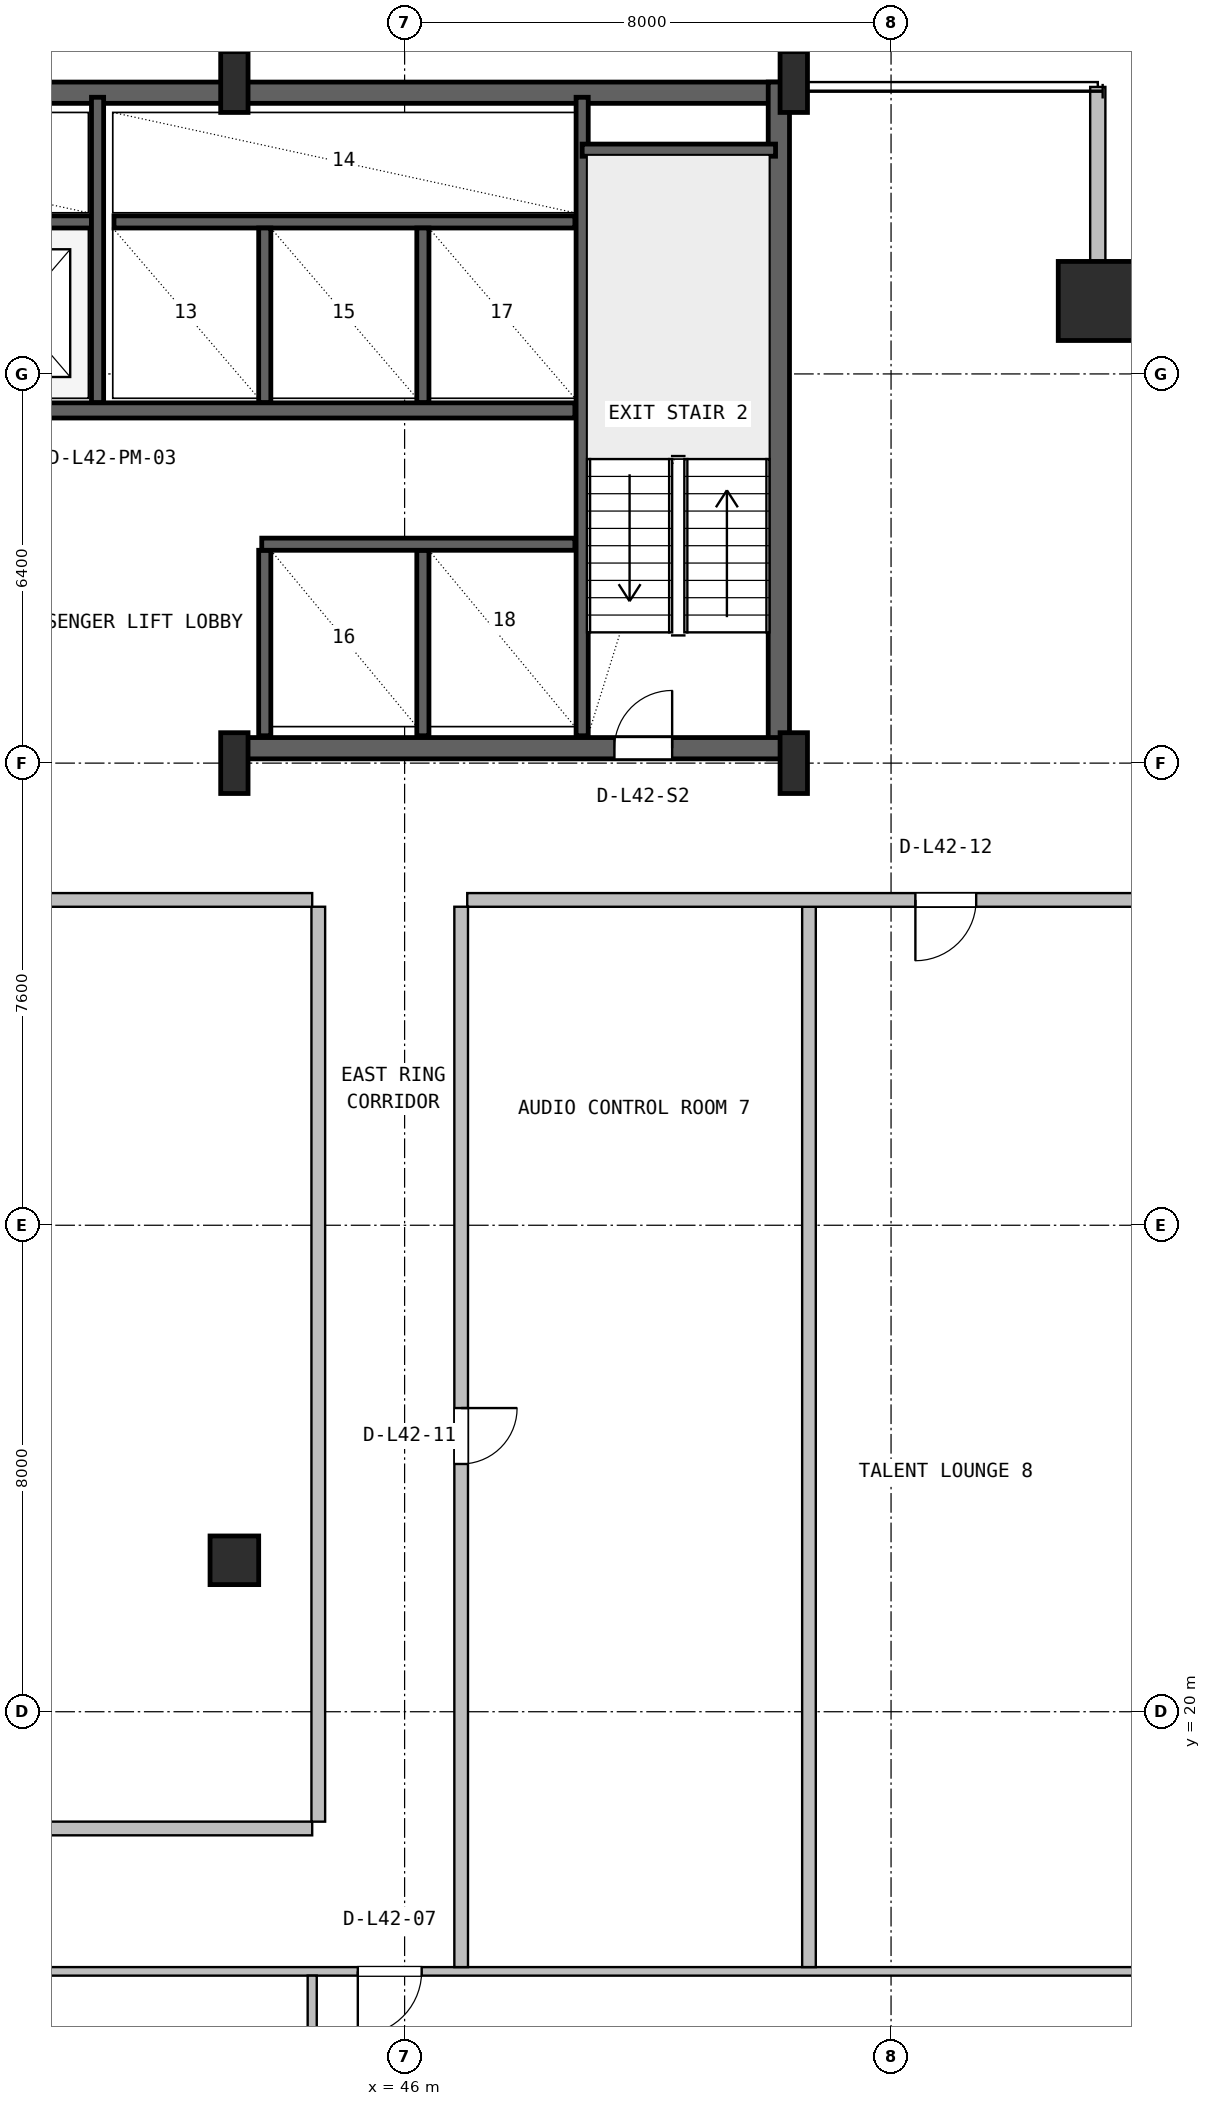
"""IFC4 building model, lengths in metres.
Left out: names, types, materials, properties, quantities, classifications, styles, units other than length and angle.
Written with IfcOpenShell. Run it as: python <this file> out.ifc"""

import sys

from ifc_helpers import new_model, si_unit, direction, frame, frame_2d, origin, origin_2d, place, context, subcontext, project, spatial, rectangle, hollow_rectangle, i_section, extrude, source, transform, mapped, element, fill, save


model = new_model("IFC4")
c1 = context("Model", 3, precision=1e-05, world=origin(), true_north=direction((0.0, 1.0)))
c2 = subcontext(c1, "Body", "Model", "MODEL_VIEW")
j1 = project(units=[si_unit("LENGTHUNIT", "METRE"), si_unit("PLANEANGLEUNIT", "RADIAN")], contexts=[c1])
p1 = place(None, origin())
s1 = spatial("IfcSite", under=j1, at=p1, CompositionType="ELEMENT")
p2 = place(p1, origin())
s2 = spatial("IfcBuilding", under=s1, at=p2, CompositionType="ELEMENT")
p3 = place(p2, frame((0.0, 0.0, 172.4)))
s3 = spatial("IfcBuildingStorey", under=s2, at=p3, CompositionType="ELEMENT", Elevation=172.4)
p4 = place(p3, frame((15.6, 46.625, 0.0), z_axis=(0.0, 0.0, 1.0), x_axis=(1.0, 0.0, 0.0)))
e1 = element("IfcWall", 1, at=p4, inside=s3, PredefinedType="SHEAR", context=c2, shape_type="SweptSolid", body=[
    extrude(rectangle(XDim=36.8, YDim=0.35, at=frame_2d((18.4, 0.0))), origin(), (0.0, 0.0, 1.0), 3.55),
])
p5 = place(p3, frame((52.155, 35.67, 0.0), z_axis=(0.0, 0.0, 1.0), x_axis=(0.0, 1.0, 0.0)))
e2 = element("IfcWall", 2, at=p5, inside=s3, PredefinedType="SHEAR", context=c2, shape_type="SweptSolid", body=[
    extrude(rectangle(XDim=11.13, YDim=0.35, at=frame_2d((5.565, 0.0))), origin(), (0.0, 0.0, 1.0), 3.55),
])
p6 = place(p3, frame((43.2, 35.845, 0.0), z_axis=(0.0, 0.0, 1.0), x_axis=(1.0, 0.0, 0.0)))
e3 = element("IfcWall", 3, at=p6, inside=s3, PredefinedType="SHEAR", context=c2, shape_type="SweptSolid", body=[
    extrude(rectangle(XDim=9.13, YDim=0.35, at=frame_2d((4.565, 0.0))), origin(), (0.0, 0.0, 1.0), 3.55),
])
p7 = place(p6, frame((6.25, 0.0, 0.0)))
e4 = element("IfcOpeningElement", 4, at=p7, cuts=e3, PredefinedType="OPENING", context=c2, shape_type="SweptSolid", body=[
    extrude(rectangle(XDim=0.95, YDim=2.1, at=frame_2d((0.475, 1.05))), frame((0.0, 0.185, 0.0), z_axis=(0.0, -1.0, 0.0), x_axis=(1.0, 0.0, 0.0)), (0.0, 0.0, 1.0), 0.37),
])
m1 = source(origin(), c2, "Body", "SweptSolid", [
    extrude(i_section(OverallWidth=0.45, OverallDepth=1.0, WebThickness=0.016, FlangeThickness=0.03, FilletRadius=0.016, at=origin_2d()), origin(), (0.0, 0.0, 1.0), 3.8),
])
for number, where, z_axis, x_axis in (
    (5, (43.2, 35.6, 0.0), (0.0, 0.0, 1.0), (1.0, 0.0, 0.0)),
    (6, (43.2, 46.8, 0.0), (0.0, 0.0, 1.0), (1.0, 0.0, 0.0)),
    (7, (52.4, 35.6, 0.0), (0.0, 0.0, 1.0), (1.0, 0.0, 0.0)),
    (8, (52.4, 46.8, 0.0), (0.0, 0.0, 1.0), (1.0, 0.0, 0.0)),
):
    element("IfcColumn", number, at=place(p3, frame(where, z_axis=z_axis, x_axis=x_axis)), inside=s3, PredefinedType="COLUMN", context=c2, shape_type="MappedRepresentation", body=[
        mapped(m1, transform((0.0, 0.0, 0.0), x_axis=(1.0, 0.0, 0.0), y_axis=(0.0, 1.0, 0.0), z_axis=(0.0, 0.0, 1.0), scale=1.0)),
    ])
m2 = source(origin(), c2, "Body", "SweptSolid", [
    extrude(hollow_rectangle(XDim=1.3, YDim=1.3, WallThickness=0.05, at=origin_2d()), origin(), (0.0, 0.0, 1.0), 3.8),
])
p8 = place(p3, frame((57.4, 43.2, 0.0), z_axis=(0.0, 0.0, 1.0), x_axis=(1.0, 0.0, 0.0)))
e9 = element("IfcColumn", 9, at=p8, inside=s3, PredefinedType="COLUMN", context=c2, shape_type="MappedRepresentation", body=[
    mapped(m2, transform((0.0, 0.0, 0.0), x_axis=(1.0, 0.0, 0.0), y_axis=(0.0, 1.0, 0.0), z_axis=(0.0, 0.0, 1.0), scale=1.0)),
])
m3 = source(origin(), c2, "Body", "SweptSolid", [
    extrude(rectangle(XDim=0.8, YDim=0.8, at=origin_2d()), origin(), (0.0, 0.0, 1.0), 3.8),
])
p9 = place(p3, frame((43.2, 22.49, 0.0), z_axis=(0.0, 0.0, 1.0), x_axis=(1.0, 0.0, 0.0)))
e10 = element("IfcColumn", 10, at=p9, inside=s3, PredefinedType="COLUMN", context=c2, shape_type="MappedRepresentation", body=[
    mapped(m3, transform((0.0, 0.0, 0.0), x_axis=(1.0, 0.0, 0.0), y_axis=(0.0, 1.0, 0.0), z_axis=(0.0, 0.0, 1.0), scale=1.0)),
])
p10 = place(p3, frame((57.53, 43.2, 0.0), z_axis=(0.0, 0.0, 1.0), x_axis=(1.0, 0.0, 0.0)))
e11 = element("IfcWall", 11, at=p10, inside=s3, PredefinedType="SOLIDWALL", context=c2, shape_type="SweptSolid", body=[
    extrude(rectangle(XDim=3.39, YDim=0.25, at=frame_2d((1.695, 0.0))), origin(), (0.0, 0.0, 1.0), 3.53),
])
p11 = place(p3, frame((57.4, 43.12, 0.0), z_axis=(0.0, 0.0, 1.0), x_axis=(0.0, 1.0, 0.0)))
e12 = element("IfcWall", 12, at=p11, inside=s3, PredefinedType="SOLIDWALL", context=c2, shape_type="SweptSolid", body=[
    extrude(rectangle(XDim=3.6, YDim=0.25, at=frame_2d((1.8, 0.0))), origin(), (0.0, 0.0, 1.0), 3.108),
])
p12 = place(p3, frame((48.92, 36.05, 0.0), z_axis=(0.0, 0.0, 1.0), x_axis=(0.0, 1.0, 0.0)))
e13 = element("IfcWall", 13, at=p12, inside=s3, PredefinedType="SHEAR", context=c2, shape_type="SweptSolid", body=[
    extrude(rectangle(XDim=10.5, YDim=0.2, at=frame_2d((5.25, 0.0))), origin(), (0.0, 0.0, 1.0), 3.55),
])
p13 = place(p3, frame((48.92, 45.68, 0.0), z_axis=(0.0, 0.0, 1.0), x_axis=(1.0, 0.0, 0.0)))
e14 = element("IfcWall", 14, at=p13, inside=s3, PredefinedType="SHEAR", context=c2, shape_type="SweptSolid", body=[
    extrude(rectangle(XDim=3.18, YDim=0.2, at=frame_2d((1.59, 0.0))), origin(), (0.0, 0.0, 1.0), 3.55),
])
p14 = place(p3, frame((24.98, 41.4, 0.0), z_axis=(0.0, 0.0, 1.0), x_axis=(1.0, 0.0, 0.0)))
e15 = element("IfcWall", 15, at=p14, inside=s3, PredefinedType="SHEAR", context=c2, shape_type="SweptSolid", body=[
    extrude(rectangle(XDim=23.82, YDim=0.25, at=frame_2d((11.91, 0.0))), origin(), (0.0, 0.0, 1.0), 3.55),
])
p15 = place(p14, frame((8.87, 0.0, 0.0)))
e16 = element("IfcOpeningElement", 16, at=p15, cuts=e15, PredefinedType="OPENING", context=c2, shape_type="SweptSolid", body=[
    extrude(rectangle(XDim=1.1, YDim=2.18, at=frame_2d((0.55, 1.09))), frame((0.0, 0.135, 0.0), z_axis=(0.0, -1.0, 0.0), x_axis=(1.0, 0.0, 0.0)), (0.0, 0.0, 1.0), 0.27),
])
p16 = place(p14, frame((11.47, 0.0, 0.0)))
e17 = element("IfcOpeningElement", 17, at=p16, cuts=e15, PredefinedType="OPENING", context=c2, shape_type="SweptSolid", body=[
    extrude(rectangle(XDim=1.1, YDim=2.18, at=frame_2d((0.55, 1.09))), frame((0.0, 0.135, 0.0), z_axis=(0.0, -1.0, 0.0), x_axis=(1.0, 0.0, 0.0)), (0.0, 0.0, 1.0), 0.27),
])
p17 = place(p14, frame((14.07, 0.0, 0.0)))
e18 = element("IfcOpeningElement", 18, at=p17, cuts=e15, PredefinedType="OPENING", context=c2, shape_type="SweptSolid", body=[
    extrude(rectangle(XDim=1.1, YDim=2.18, at=frame_2d((0.55, 1.09))), frame((0.0, 0.135, 0.0), z_axis=(0.0, -1.0, 0.0), x_axis=(1.0, 0.0, 0.0)), (0.0, 0.0, 1.0), 0.27),
])
p18 = place(p14, frame((1.81, 0.0, 0.0)))
e19 = element("IfcOpeningElement", 19, at=p18, cuts=e15, PredefinedType="OPENING", context=c2, shape_type="SweptSolid", body=[
    extrude(rectangle(XDim=0.92, YDim=2.08, at=frame_2d((0.46, 1.04))), frame((0.0, 0.135, 0.0), z_axis=(0.0, -1.0, 0.0), x_axis=(1.0, 0.0, 0.0)), (0.0, 0.0, 1.0), 0.27),
])
p19 = place(p14, frame((5.71, 0.0, 0.0)))
e20 = element("IfcOpeningElement", 20, at=p19, cuts=e15, PredefinedType="OPENING", context=c2, shape_type="SweptSolid", body=[
    extrude(rectangle(XDim=0.92, YDim=2.08, at=frame_2d((0.46, 1.04))), frame((0.0, 0.135, 0.0), z_axis=(0.0, -1.0, 0.0), x_axis=(1.0, 0.0, 0.0)), (0.0, 0.0, 1.0), 0.27),
])
p20 = place(p3, frame((33.22, 44.5, 0.0), z_axis=(0.0, 0.0, 1.0), x_axis=(1.0, 0.0, 0.0)))
e21 = element("IfcWall", 21, at=p20, inside=s3, PredefinedType="SHEAR", context=c2, shape_type="SweptSolid", body=[
    extrude(rectangle(XDim=7.63, YDim=0.2, at=frame_2d((3.815, 0.0))), origin(), (0.0, 0.0, 1.0), 3.55),
])
p21 = place(p3, frame((40.95, 41.53, 0.0), z_axis=(0.0, 0.0, 1.0), x_axis=(0.0, 1.0, 0.0)))
e22 = element("IfcWall", 22, at=p21, inside=s3, PredefinedType="SHEAR", context=c2, shape_type="SweptSolid", body=[
    extrude(rectangle(XDim=5.02, YDim=0.2, at=frame_2d((2.51, 0.0))), origin(), (0.0, 0.0, 1.0), 3.55),
])
p22 = place(p3, frame((41.22, 44.5, 0.0), z_axis=(0.0, 0.0, 1.0), x_axis=(1.0, 0.0, 0.0)))
e23 = element("IfcWall", 23, at=p22, inside=s3, PredefinedType="SHEAR", context=c2, shape_type="SweptSolid", body=[
    extrude(rectangle(XDim=7.58, YDim=0.2, at=frame_2d((3.79, 0.0))), origin(), (0.0, 0.0, 1.0), 3.55),
])
for number, where, z_axis, x_axis in (
    (24, (43.7, 41.53, 0.0), (0.0, 0.0, 1.0), (0.0, 1.0, 0.0)),
    (25, (46.3, 41.53, 0.0), (0.0, 0.0, 1.0), (0.0, 1.0, 0.0)),
):
    element("IfcWall", number, at=place(p3, frame(where, z_axis=z_axis, x_axis=x_axis)), inside=s3, PredefinedType="SHEAR", context=c2, shape_type="SweptSolid", body=[
        extrude(rectangle(XDim=2.87, YDim=0.2, at=frame_2d((1.435, 0.0))), origin(), (0.0, 0.0, 1.0), 3.55),
    ])
for number, where, z_axis, x_axis in (
    (26, (43.7, 36.05, 0.0), (0.0, 0.0, 1.0), (0.0, 1.0, 0.0)),
    (27, (46.3, 36.05, 0.0), (0.0, 0.0, 1.0), (0.0, 1.0, 0.0)),
):
    element("IfcWall", number, at=place(p3, frame(where, z_axis=z_axis, x_axis=x_axis)), inside=s3, PredefinedType="SHEAR", context=c2, shape_type="SweptSolid", body=[
        extrude(rectangle(XDim=3.05, YDim=0.2, at=frame_2d((1.525, 0.0))), origin(), (0.0, 0.0, 1.0), 3.55),
    ])
p23 = place(p3, frame((43.65, 39.2, 0.0), z_axis=(0.0, 0.0, 1.0), x_axis=(1.0, 0.0, 0.0)))
e28 = element("IfcWall", 28, at=p23, inside=s3, PredefinedType="SHEAR", context=c2, shape_type="SweptSolid", body=[
    extrude(rectangle(XDim=5.15, YDim=0.2, at=frame_2d((2.575, 0.0))), origin(), (0.0, 0.0, 1.0), 3.55),
])
p24 = place(p3, frame((7.18, 15.73, 0.0), z_axis=(0.0, 0.0, 1.0), x_axis=(1.0, 0.0, 0.0)))
e29 = element("IfcWall", 29, at=p24, inside=s3, PredefinedType="PARTITIONING", context=c2, shape_type="SweptSolid", body=[
    extrude(rectangle(XDim=53.64, YDim=0.14, at=frame_2d((26.82, 0.0))), origin(), (0.0, 0.0, 1.0), 2.909),
])
p25 = place(p24, frame((14.035, 0.0, 0.0)))
e30 = element("IfcOpeningElement", 30, at=p25, cuts=e29, PredefinedType="OPENING", context=c2, shape_type="SweptSolid", body=[
    extrude(rectangle(XDim=1.0, YDim=2.1, at=frame_2d((0.5, 1.05))), frame((0.0, 0.08, 0.0), z_axis=(0.0, -1.0, 0.0), x_axis=(1.0, 0.0, 0.0)), (0.0, 0.0, 1.0), 0.16),
])
p26 = place(p24, frame((26.115, 0.0, 0.0)))
e31 = element("IfcOpeningElement", 31, at=p26, cuts=e29, PredefinedType="OPENING", context=c2, shape_type="SweptSolid", body=[
    extrude(rectangle(XDim=0.88, YDim=2.06, at=frame_2d((0.44, 1.03))), frame((0.0, 0.08, 0.0), z_axis=(0.0, -1.0, 0.0), x_axis=(1.0, 0.0, 0.0)), (0.0, 0.0, 1.0), 0.16),
])
p27 = place(p24, frame((38.05, 0.0, 0.0)))
e32 = element("IfcOpeningElement", 32, at=p27, cuts=e29, PredefinedType="OPENING", context=c2, shape_type="SweptSolid", body=[
    extrude(rectangle(XDim=1.05, YDim=2.1, at=frame_2d((0.525, 1.05))), frame((0.0, 0.08, 0.0), z_axis=(0.0, -1.0, 0.0), x_axis=(1.0, 0.0, 0.0)), (0.0, 0.0, 1.0), 0.16),
])
p28 = place(p3, frame((44.48, 7.38, 0.0), z_axis=(0.0, 0.0, 1.0), x_axis=(0.0, 1.0, 0.0)))
e33 = element("IfcWall", 33, at=p28, inside=s3, PredefinedType="PARTITIONING", context=c2, shape_type="SweptSolid", body=[
    extrude(rectangle(XDim=8.28, YDim=0.15, at=frame_2d((4.14, 0.0))), origin(), (0.0, 0.0, 1.0), 3.108),
])
p29 = place(p3, frame((22.99, 18.08, 0.0), z_axis=(0.0, 0.0, 1.0), x_axis=(1.0, 0.0, 0.0)))
e34 = element("IfcWall", 34, at=p29, inside=s3, PredefinedType="PARTITIONING", context=c2, shape_type="SweptSolid", body=[
    extrude(rectangle(XDim=21.49, YDim=0.225, at=frame_2d((10.745, 0.0))), origin(), (0.0, 0.0, 1.0), 2.909),
])
p30 = place(p29, frame((10.045, 0.0, 0.0)))
e35 = element("IfcOpeningElement", 35, at=p30, cuts=e34, PredefinedType="OPENING", context=c2, shape_type="SweptSolid", body=[
    extrude(rectangle(XDim=1.4, YDim=2.12, at=frame_2d((0.7, 1.06))), frame((0.0, 0.123, 0.0), z_axis=(0.0, -1.0, 0.0), x_axis=(1.0, 0.0, 0.0)), (0.0, 0.0, 1.0), 0.245),
])
p31 = place(p3, frame((44.58, 18.192, 0.0), z_axis=(0.0, 0.0, 1.0), x_axis=(0.0, 1.0, 0.0)))
e36 = element("IfcWall", 36, at=p31, inside=s3, PredefinedType="PARTITIONING", context=c2, shape_type="SweptSolid", body=[
    extrude(rectangle(XDim=15.046, YDim=0.225, at=frame_2d((7.523, 0.0))), origin(), (0.0, 0.0, 1.0), 3.222),
])
p32 = place(p3, frame((22.99, 33.35, 0.0), z_axis=(0.0, 0.0, 1.0), x_axis=(1.0, 0.0, 0.0)))
e37 = element("IfcWall", 37, at=p32, inside=s3, PredefinedType="PARTITIONING", context=c2, shape_type="SweptSolid", body=[
    extrude(rectangle(XDim=21.49, YDim=0.225, at=frame_2d((10.745, 0.0))), origin(), (0.0, 0.0, 1.0), 2.909),
])
p33 = place(p3, frame((52.65, 15.8, 0.0), z_axis=(0.0, 0.0, 1.0), x_axis=(0.0, 1.0, 0.0)))
e38 = element("IfcWall", 38, at=p33, inside=s3, PredefinedType="PARTITIONING", context=c2, shape_type="SweptSolid", body=[
    extrude(rectangle(XDim=17.438, YDim=0.225, at=frame_2d((8.719, 0.0))), origin(), (0.0, 0.0, 1.0), 3.222),
])
p34 = place(p3, frame((47.03, 33.35, 0.0), z_axis=(0.0, 0.0, 1.0), x_axis=(1.0, 0.0, 0.0)))
e39 = element("IfcWall", 39, at=p34, inside=s3, PredefinedType="PARTITIONING", context=c2, shape_type="SweptSolid", body=[
    extrude(rectangle(XDim=13.79, YDim=0.225, at=frame_2d((6.895, 0.0))), origin(), (0.0, 0.0, 1.0), 3.108),
])
p35 = place(p34, frame((7.37, 0.0, 0.0)))
e40 = element("IfcOpeningElement", 40, at=p35, cuts=e39, PredefinedType="OPENING", context=c2, shape_type="SweptSolid", body=[
    extrude(rectangle(XDim=1.0, YDim=2.1, at=frame_2d((0.5, 1.05))), frame((0.0, 0.123, 0.0), z_axis=(0.0, -1.0, 0.0), x_axis=(1.0, 0.0, 0.0)), (0.0, 0.0, 1.0), 0.245),
])
p36 = place(p3, frame((46.93, 15.8, 0.0), z_axis=(0.0, 0.0, 1.0), x_axis=(0.0, 1.0, 0.0)))
e41 = element("IfcWall", 41, at=p36, inside=s3, PredefinedType="PARTITIONING", context=c2, shape_type="SweptSolid", body=[
    extrude(rectangle(XDim=17.438, YDim=0.225, at=frame_2d((8.719, 0.0))), origin(), (0.0, 0.0, 1.0), 3.222),
])
p37 = place(p36, frame((8.274, 0.0, 0.0)))
e42 = element("IfcOpeningElement", 42, at=p37, cuts=e41, PredefinedType="OPENING", context=c2, shape_type="SweptSolid", body=[
    extrude(rectangle(XDim=0.92, YDim=2.08, at=frame_2d((0.46, 1.04))), frame((0.0, 0.123, 0.0), z_axis=(0.0, -1.0, 0.0), x_axis=(1.0, 0.0, 0.0)), (0.0, 0.0, 1.0), 0.245),
])
m4 = source(origin(), c2, "Body", "SweptSolid", [
    extrude(rectangle(XDim=0.95, YDim=2.1, at=frame_2d((0.475, 1.05))), frame((0.0, 0.025, 0.0), z_axis=(0.0, -1.0, 0.0), x_axis=(1.0, 0.0, 0.0)), (0.0, 0.0, 1.0), 0.05),
])
p38 = place(p7, origin())
e43 = element("IfcDoor", 43, at=p38, inside=s3, OperationType="SINGLE_SWING_RIGHT", PredefinedType="DOOR", context=c2, shape_type="MappedRepresentation", body=[
    mapped(m4, transform((0.0, 0.0, 0.0), x_axis=(1.0, 0.0, 0.0), y_axis=(0.0, 1.0, 0.0), z_axis=(0.0, 0.0, 1.0), scale=1.0)),
])
fill(e4, e43)
m5 = source(origin(), c2, "Body", "SweptSolid", [
    extrude(rectangle(XDim=1.05, YDim=2.1, at=frame_2d((0.525, 1.05))), frame((0.0, 0.025, 0.0), z_axis=(0.0, -1.0, 0.0), x_axis=(1.0, 0.0, 0.0)), (0.0, 0.0, 1.0), 0.05),
])
p39 = place(p27, frame((1.05, 0.0, 0.0), z_axis=(0.0, 0.0, 1.0), x_axis=(-1.0, 0.0, 0.0)))
e44 = element("IfcDoor", 44, at=p39, inside=s3, OperationType="SINGLE_SWING_LEFT", PredefinedType="DOOR", context=c2, shape_type="MappedRepresentation", body=[
    mapped(m5, transform((0.0, 0.0, 0.0), x_axis=(1.0, 0.0, 0.0), y_axis=(0.0, 1.0, 0.0), z_axis=(0.0, 0.0, 1.0), scale=1.0)),
])
fill(e32, e44)
m6 = source(origin(), c2, "Body", "SweptSolid", [
    extrude(rectangle(XDim=0.92, YDim=2.08, at=frame_2d((0.46, 1.04))), frame((0.0, 0.025, 0.0), z_axis=(0.0, -1.0, 0.0), x_axis=(1.0, 0.0, 0.0)), (0.0, 0.0, 1.0), 0.05),
])
p40 = place(p37, frame((0.92, 0.0, 0.0), z_axis=(0.0, 0.0, 1.0), x_axis=(-1.0, 0.0, 0.0)))
e45 = element("IfcDoor", 45, at=p40, inside=s3, OperationType="SINGLE_SWING_RIGHT", PredefinedType="DOOR", context=c2, shape_type="MappedRepresentation", body=[
    mapped(m6, transform((0.0, 0.0, 0.0), x_axis=(1.0, 0.0, 0.0), y_axis=(0.0, 1.0, 0.0), z_axis=(0.0, 0.0, 1.0), scale=1.0)),
])
fill(e42, e45)
m7 = source(origin(), c2, "Body", "SweptSolid", [
    extrude(rectangle(XDim=1.0, YDim=2.1, at=frame_2d((0.5, 1.05))), frame((0.0, 0.025, 0.0), z_axis=(0.0, -1.0, 0.0), x_axis=(1.0, 0.0, 0.0)), (0.0, 0.0, 1.0), 0.05),
])
p41 = place(p35, frame((1.0, 0.0, 0.0), z_axis=(0.0, 0.0, 1.0), x_axis=(-1.0, 0.0, 0.0)))
e46 = element("IfcDoor", 46, at=p41, inside=s3, OperationType="SINGLE_SWING_LEFT", PredefinedType="DOOR", context=c2, shape_type="MappedRepresentation", body=[
    mapped(m7, transform((0.0, 0.0, 0.0), x_axis=(1.0, 0.0, 0.0), y_axis=(0.0, 1.0, 0.0), z_axis=(0.0, 0.0, 1.0), scale=1.0)),
])
fill(e40, e46)
save(model, sys.argv[1])
